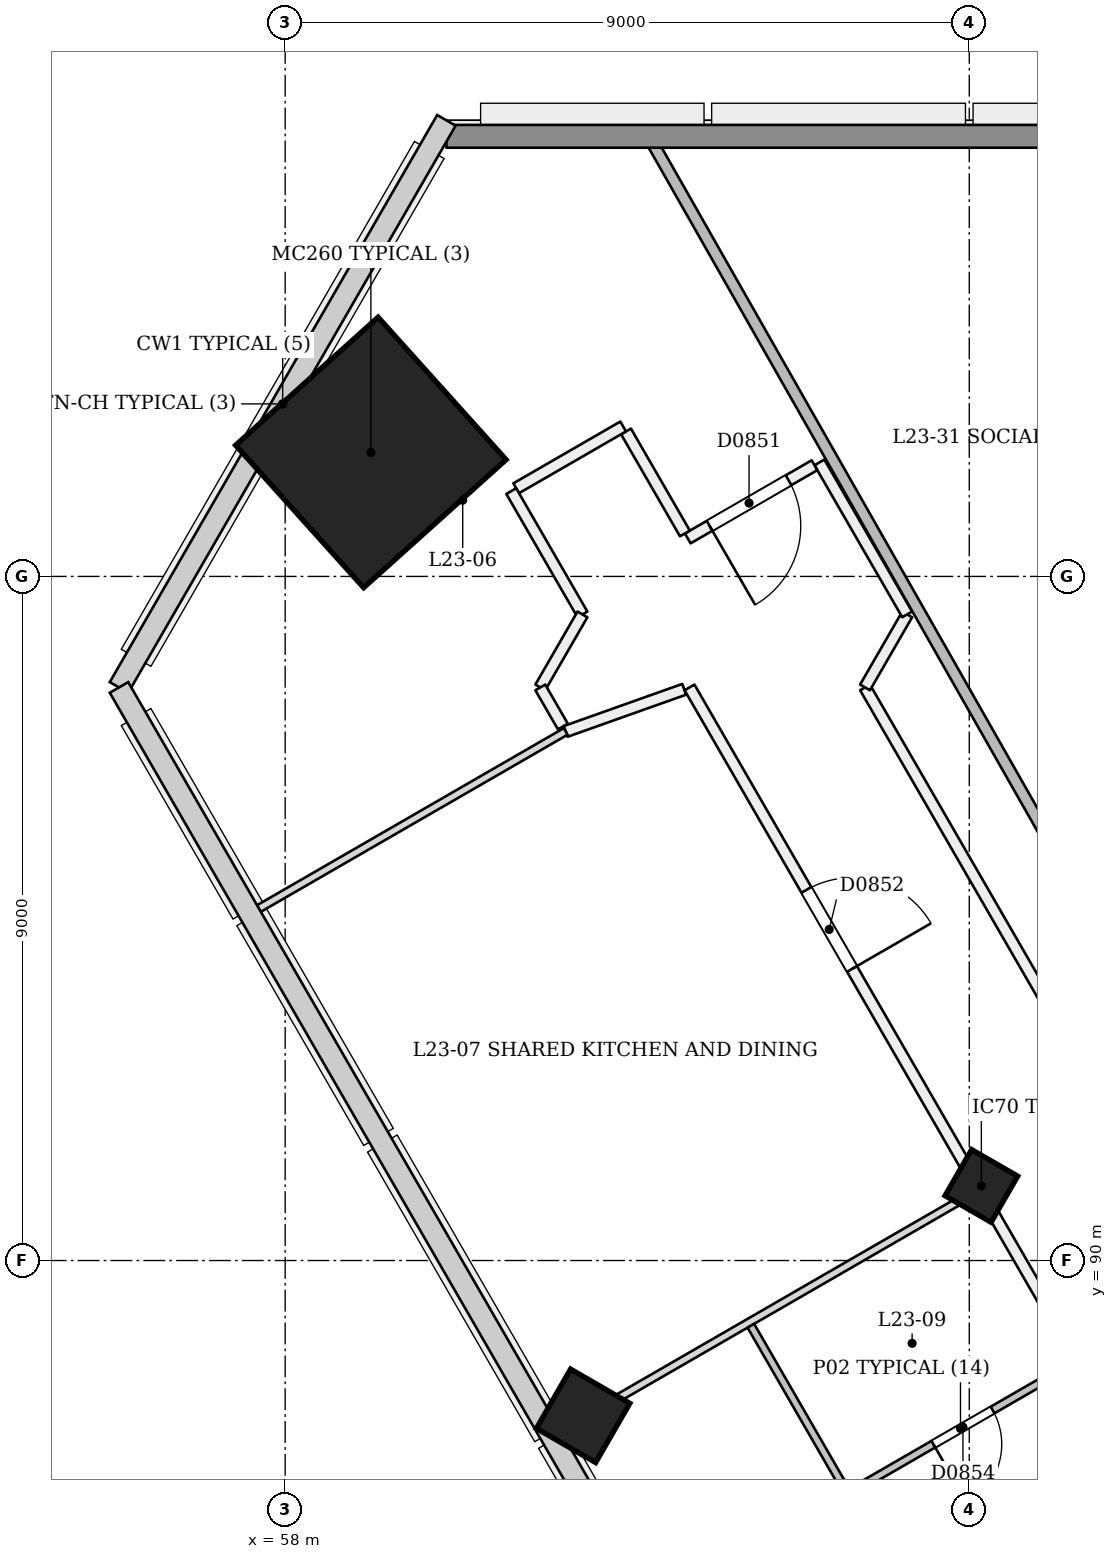
"""IFC4 building model, lengths in metres.
Left out: names, types, materials, properties, quantities, classifications, styles, units other than length and angle.
Written with IfcOpenShell. Run it as: python <this file> out.ifc"""

import sys

from ifc_helpers import new_model, si_unit, direction, frame, frame_2d, origin, origin_2d, place, context, subcontext, project, spatial, rectangle, extrude, element, fill, save


model = new_model("IFC4")
c1 = context("Model", 3, precision=1e-05, world=origin(), true_north=direction((0.0, 1.0)))
c2 = subcontext(c1, "Body", "Model", "MODEL_VIEW")
j1 = project(units=[si_unit("LENGTHUNIT", "METRE"), si_unit("PLANEANGLEUNIT", "RADIAN")], contexts=[c1])
p1 = place(None, origin())
s1 = spatial("IfcSite", under=j1, at=p1, CompositionType="ELEMENT")
p2 = place(p1, origin())
s2 = spatial("IfcBuilding", under=s1, at=p2, CompositionType="ELEMENT")
p3 = place(p2, frame((0.0, 0.0, 91.8)))
s3 = spatial("IfcBuildingStorey", under=s2, at=p3, CompositionType="ELEMENT", Elevation=91.8)
p4 = place(p3, frame((67.132, 90.934, -0.021), z_axis=(0.022155133694, 0.038483534979, 0.999013597298), x_axis=(-0.864980082328, -0.500330471121, 0.038456167821)))
e1 = element("IfcColumn", 1, at=p4, inside=s3, PredefinedType="COLUMN", context=c2, shape_type="SweptSolid", body=[
    extrude(rectangle(XDim=0.7, YDim=0.7, at=origin_2d()), origin(), (0.0, 0.0, 1.0), 3.604),
])
p5 = place(p3, frame((59.093, 100.62, 0.0), z_axis=(0.028403739082, 0.009219352065, 0.999554016126), x_axis=(-0.865122942828, 0.501162491493, 0.01996123528)))
e2 = element("IfcColumn", 2, at=p5, inside=s3, PredefinedType="COLUMN", context=c2, shape_type="SweptSolid", body=[
    extrude(rectangle(XDim=2.52, YDim=2.52, at=origin_2d()), origin(), (0.0, 0.0, 1.0), 3.602),
])
p6 = place(p3, frame((61.892, 87.909, -0.027), z_axis=(0.022189843276, 0.038462395012, 0.999013641061), x_axis=(-0.865440194325, -0.49953425098, 0.038455196587)))
e3 = element("IfcColumn", 3, at=p6, inside=s3, PredefinedType="COLUMN", context=c2, shape_type="SweptSolid", body=[
    extrude(rectangle(XDim=0.9, YDim=0.9, at=origin_2d()), origin(), (0.0, 0.0, 1.0), 3.631),
])
p7 = place(p3, frame((68.596, 92.4, 0.0), z_axis=(0.0, 0.0, 1.0), x_axis=(-0.500019194352, 0.866014321637, 0.0)))
e4 = element("IfcWall", 4, at=p7, inside=s3, PredefinedType="PARTITIONING", context=c2, shape_type="SweptSolid", body=[
    extrude(rectangle(XDim=5.935, YDim=0.15, at=frame_2d((2.967, 0.0))), origin(), (0.0, 0.0, 1.0), 3.3),
])
p8 = place(p3, frame((65.629, 97.54, 0.0), z_axis=(0.0, 0.0, 1.0), x_axis=(0.50011622646, 0.865958290007, 0.0)))
e5 = element("IfcWall", 5, at=p8, inside=s3, PredefinedType="PARTITIONING", context=c2, shape_type="SweptSolid", body=[
    extrude(rectangle(XDim=1.109, YDim=0.15, at=frame_2d((0.555, 0.0))), origin(), (0.0, 0.0, 1.0), 3.3),
])
p9 = place(p3, frame((66.183, 98.5, 0.0), z_axis=(0.0, 0.0, 1.0), x_axis=(-0.500027479704, 0.866009537788, 0.0)))
e6 = element("IfcWall", 6, at=p9, inside=s3, PredefinedType="PARTITIONING", context=c2, shape_type="SweptSolid", body=[
    extrude(rectangle(XDim=2.309, YDim=0.15, at=frame_2d((1.155, 0.0))), origin(), (0.0, 0.0, 1.0), 3.3),
])
p10 = place(p3, frame((64.964, 100.462, 0.0), z_axis=(0.0, 0.0, 1.0), x_axis=(-0.866033512162, -0.499985955615, 0.0)))
e7 = element("IfcWall", 7, at=p10, inside=s3, PredefinedType="PARTITIONING", context=c2, shape_type="SweptSolid", body=[
    extrude(rectangle(XDim=1.925, YDim=0.15, at=frame_2d((0.962, 0.0))), origin(), (0.0, 0.0, 1.0), 3.3),
])
p11 = place(p10, frame((0.394, 0.0, 0.0)))
e8 = element("IfcOpeningElement", 8, at=p11, cuts=e7, PredefinedType="OPENING", context=c2, shape_type="SweptSolid", body=[
    extrude(rectangle(XDim=1.2, YDim=2.1, at=frame_2d((0.6, 1.05))), frame((0.0, 0.085, 0.0), z_axis=(0.0, -1.0, 0.0), x_axis=(1.0, 0.0, 0.0)), (0.0, 0.0, 1.0), 0.171),
])
p12 = place(p3, frame((63.259, 99.565, 0.0), z_axis=(0.0, 0.0, 1.0), x_axis=(-0.499967891604, 0.866043940782, 0.0)))
e9 = element("IfcWall", 9, at=p12, inside=s3, PredefinedType="PARTITIONING", context=c2, shape_type="SweptSolid", body=[
    extrude(rectangle(XDim=1.55, YDim=0.15, at=frame_2d((0.775, 0.0))), origin(), (0.0, 0.0, 1.0), 3.3),
])
p13 = place(p3, frame((62.447, 100.972, 0.0), z_axis=(0.0, 0.0, 1.0), x_axis=(-0.866015446554, -0.500017246033, 0.0)))
e10 = element("IfcWall", 10, at=p13, inside=s3, PredefinedType="PARTITIONING", context=c2, shape_type="SweptSolid", body=[
    extrude(rectangle(XDim=1.625, YDim=0.15, at=frame_2d((0.812, 0.0))), origin(), (0.0, 0.0, 1.0), 3.3),
])
p14 = place(p3, frame((60.974, 100.122, 0.0), z_axis=(0.0, 0.0, 1.0), x_axis=(0.499951854219, -0.86605319898, 0.0)))
e11 = element("IfcWall", 11, at=p14, inside=s3, PredefinedType="PARTITIONING", context=c2, shape_type="SweptSolid", body=[
    extrude(rectangle(XDim=1.873, YDim=0.15, at=frame_2d((0.937, 0.0))), origin(), (0.0, 0.0, 1.0), 3.3),
])
p15 = place(p3, frame((61.911, 98.5, 0.0), z_axis=(0.0, 0.0, 1.0), x_axis=(-0.499951133605, -0.866053614973, 0.0)))
e12 = element("IfcWall", 12, at=p15, inside=s3, PredefinedType="PARTITIONING", context=c2, shape_type="SweptSolid", body=[
    extrude(rectangle(XDim=1.109, YDim=0.15, at=frame_2d((0.554, 0.0))), origin(), (0.0, 0.0, 1.0), 3.3),
])
p16 = place(p3, frame((61.356, 97.54, 0.0), z_axis=(0.0, 0.0, 1.0), x_axis=(0.499983247966, -0.86603507536, 0.0)))
e13 = element("IfcWall", 13, at=p16, inside=s3, PredefinedType="PARTITIONING", context=c2, shape_type="SweptSolid", body=[
    extrude(rectangle(XDim=0.594, YDim=0.15, at=frame_2d((0.297, 0.0))), origin(), (0.0, 0.0, 1.0), 3.3),
])
p17 = place(p3, frame((61.69, 96.961, 0.0), z_axis=(0.0, 0.0, 1.0), x_axis=(0.942304690634, 0.334756433858, 0.0)))
e14 = element("IfcWall", 14, at=p17, inside=s3, PredefinedType="PARTITIONING", context=c2, shape_type="SweptSolid", body=[
    extrude(rectangle(XDim=1.655, YDim=0.15, at=frame_2d((0.827, 0.0))), origin(), (0.0, 0.0, 1.0), 3.3),
])
p18 = place(p3, frame((63.319, 97.54, 0.0), z_axis=(0.0, 0.0, 1.0), x_axis=(0.500001382442, -0.86602460563, 0.0)))
e15 = element("IfcWall", 15, at=p18, inside=s3, PredefinedType="PARTITIONING", context=c2, shape_type="SweptSolid", body=[
    extrude(rectangle(XDim=42.252, YDim=0.15, at=frame_2d((21.126, 0.0))), origin(), (0.0, 0.0, 1.0), 2.9),
])
p19 = place(p18, frame((3.076, 0.0, 0.0)))
e16 = element("IfcOpeningElement", 16, at=p19, cuts=e15, PredefinedType="OPENING", context=c2, shape_type="SweptSolid", body=[
    extrude(rectangle(XDim=1.2, YDim=2.1, at=frame_2d((0.6, 1.05))), frame((0.0, 0.085, 0.0), z_axis=(0.0, -1.0, 0.0), x_axis=(1.0, 0.0, 0.0)), (0.0, 0.0, 1.0), 0.171),
])
p20 = place(p18, frame((10.455, 0.0, 0.0)))
e17 = element("IfcOpeningElement", 17, at=p20, cuts=e15, PredefinedType="OPENING", context=c2, shape_type="SweptSolid", body=[
    extrude(rectangle(XDim=1.1, YDim=2.1, at=frame_2d((0.55, 1.05))), frame((0.0, 0.085, 0.0), z_axis=(0.0, -1.0, 0.0), x_axis=(1.0, 0.0, 0.0)), (0.0, 0.0, 1.0), 0.171),
])
p21 = place(p18, frame((13.876, 0.0, 0.0)))
e18 = element("IfcOpeningElement", 18, at=p21, cuts=e15, PredefinedType="OPENING", context=c2, shape_type="SweptSolid", body=[
    extrude(rectangle(XDim=1.0, YDim=2.1, at=frame_2d((0.5, 1.05))), frame((0.0, 0.085, 0.0), z_axis=(0.0, -1.0, 0.0), x_axis=(1.0, 0.0, 0.0)), (0.0, 0.0, 1.0), 0.171),
])
p22 = place(p18, frame((18.376, 0.0, 0.0)))
e19 = element("IfcOpeningElement", 19, at=p22, cuts=e15, PredefinedType="OPENING", context=c2, shape_type="SweptSolid", body=[
    extrude(rectangle(XDim=1.0, YDim=2.1, at=frame_2d((0.5, 1.05))), frame((0.0, 0.085, 0.0), z_axis=(0.0, -1.0, 0.0), x_axis=(1.0, 0.0, 0.0)), (0.0, 0.0, 1.0), 0.171),
])
p23 = place(p18, frame((21.731, 0.0, 0.0)))
e20 = element("IfcOpeningElement", 20, at=p23, cuts=e15, PredefinedType="OPENING", context=c2, shape_type="SweptSolid", body=[
    extrude(rectangle(XDim=1.0, YDim=2.1, at=frame_2d((0.5, 1.05))), frame((0.0, 0.085, 0.0), z_axis=(0.0, -1.0, 0.0), x_axis=(1.0, 0.0, 0.0)), (0.0, 0.0, 1.0), 0.171),
])
p24 = place(p18, frame((28.406, 0.0, 0.0)))
e21 = element("IfcOpeningElement", 21, at=p24, cuts=e15, PredefinedType="OPENING", context=c2, shape_type="SweptSolid", body=[
    extrude(rectangle(XDim=1.0, YDim=2.1, at=frame_2d((0.5, 1.05))), frame((0.0, 0.085, 0.0), z_axis=(0.0, -1.0, 0.0), x_axis=(1.0, 0.0, 0.0)), (0.0, 0.0, 1.0), 0.171),
])
p25 = place(p18, frame((30.847, 0.0, 0.0)))
e22 = element("IfcOpeningElement", 22, at=p25, cuts=e15, PredefinedType="OPENING", context=c2, shape_type="SweptSolid", body=[
    extrude(rectangle(XDim=1.0, YDim=2.1, at=frame_2d((0.5, 1.05))), frame((0.0, 0.085, 0.0), z_axis=(0.0, -1.0, 0.0), x_axis=(1.0, 0.0, 0.0)), (0.0, 0.0, 1.0), 0.171),
])
p26 = place(p18, frame((37.989, 0.0, 0.0)))
e23 = element("IfcOpeningElement", 23, at=p26, cuts=e15, PredefinedType="OPENING", context=c2, shape_type="SweptSolid", body=[
    extrude(rectangle(XDim=1.2, YDim=2.1, at=frame_2d((0.6, 1.05))), frame((0.0, 0.085, 0.0), z_axis=(0.0, -1.0, 0.0), x_axis=(1.0, 0.0, 0.0)), (0.0, 0.0, 1.0), 0.171),
])
p27 = place(p3, frame((57.603, 94.601, 0.0), z_axis=(0.0, 0.0, 1.0), x_axis=(0.866028828302, 0.499994068514, 0.0)))
e24 = element("IfcWall", 24, at=p27, inside=s3, PredefinedType="PARTITIONING", context=c2, shape_type="SweptSolid", body=[
    extrude(rectangle(XDim=4.72, YDim=0.1, at=frame_2d((2.36, 0.0))), origin(), (0.0, 0.0, 1.0), 3.3),
])
p28 = place(p3, frame((69.829, 92.401, 0.0), z_axis=(0.0, 0.0, 1.0), x_axis=(-0.494399076239, 0.869235039223, 0.0)))
e25 = element("IfcWall", 25, at=p28, inside=s3, PredefinedType="PARTITIONING", context=c2, shape_type="SweptSolid", body=[
    extrude(rectangle(XDim=14.379, YDim=0.15, at=frame_2d((7.19, 0.0))), origin(), (0.0, 0.0, 1.0), 3.3),
])
p29 = place(p3, frame((61.59, 87.735, 0.0), z_axis=(0.0, 0.0, 1.0), x_axis=(0.866015887322, 0.500016482634, 0.0)))
e26 = element("IfcWall", 26, at=p29, inside=s3, PredefinedType="PARTITIONING", context=c2, shape_type="SweptSolid", body=[
    extrude(rectangle(XDim=6.325, YDim=0.1, at=frame_2d((3.163, 0.0))), origin(), (0.0, 0.0, 1.0), 2.9),
])
p30 = place(p3, frame((68.367, 88.646, 0.0), z_axis=(0.0, 0.0, 1.0), x_axis=(-0.866032454348, -0.499987787867, 0.0)))
e27 = element("IfcWall", 27, at=p30, inside=s3, PredefinedType="PARTITIONING", context=c2, shape_type="SweptSolid", body=[
    extrude(rectangle(XDim=3.425, YDim=0.1, at=frame_2d((1.712, 0.0))), origin(), (0.0, 0.0, 1.0), 3.3),
])
p31 = place(p30, frame((1.225, 0.0, 0.0)))
e28 = element("IfcOpeningElement", 28, at=p31, cuts=e27, PredefinedType="OPENING", context=c2, shape_type="SweptSolid", body=[
    extrude(rectangle(XDim=0.9, YDim=2.1, at=frame_2d((0.45, 1.05))), frame((0.0, 0.061, 0.0), z_axis=(0.0, -1.0, 0.0), x_axis=(1.0, 0.0, 0.0)), (0.0, 0.0, 1.0), 0.121),
])
p32 = place(p3, frame((65.401, 86.934, 0.0), z_axis=(0.0, 0.0, 1.0), x_axis=(-0.499990435942, 0.866030925526, 0.0)))
e29 = element("IfcWall", 29, at=p32, inside=s3, PredefinedType="PARTITIONING", context=c2, shape_type="SweptSolid", body=[
    extrude(rectangle(XDim=2.55, YDim=0.1, at=frame_2d((1.275, 0.0))), origin(), (0.0, 0.0, 1.0), 2.9),
])
p33 = place(p3, frame((60.121, 104.79, 0.0), z_axis=(0.0, 0.0, 1.0), x_axis=(1.0, 0.0, 0.0)))
e30 = element("IfcWall", 30, at=p33, inside=s3, PredefinedType="SOLIDWALL", context=c2, shape_type="SweptSolid", body=[
    extrude(rectangle(XDim=49.758, YDim=0.3, at=frame_2d((24.879, 0.0))), origin(), (0.0, 0.0, 1.0), 3.3),
])
p34 = place(p11, origin())
e31 = element("IfcDoor", 31, at=p34, inside=s3, OperationType="SINGLE_SWING_RIGHT", PredefinedType="NOTDEFINED", context=c2, shape_type="SweptSolid", body=[
    extrude(rectangle(XDim=1.2, YDim=2.1, at=frame_2d((0.6, 1.05))), frame((0.0, 0.025, 0.0), z_axis=(0.0, -1.0, 0.0), x_axis=(1.0, 0.0, 0.0)), (0.0, 0.0, 1.0), 0.05),
])
fill(e8, e31)
p35 = place(p19, origin())
e32 = element("IfcDoor", 32, at=p35, inside=s3, OperationType="SINGLE_SWING_RIGHT", PredefinedType="NOTDEFINED", context=c2, shape_type="SweptSolid", body=[
    extrude(rectangle(XDim=1.2, YDim=2.1, at=frame_2d((0.6, 1.05))), frame((0.0, 0.025, 0.0), z_axis=(0.0, -1.0, 0.0), x_axis=(1.0, 0.0, 0.0)), (0.0, 0.0, 1.0), 0.05),
])
fill(e16, e32)
p36 = place(p31, origin())
e33 = element("IfcDoor", 33, at=p36, inside=s3, OperationType="SINGLE_SWING_RIGHT", PredefinedType="NOTDEFINED", context=c2, shape_type="SweptSolid", body=[
    extrude(rectangle(XDim=0.9, YDim=2.1, at=frame_2d((0.45, 1.05))), frame((0.0, 0.025, 0.0), z_axis=(0.0, -1.0, 0.0), x_axis=(1.0, 0.0, 0.0)), (0.0, 0.0, 1.0), 0.05),
])
fill(e28, e33)
save(model, sys.argv[1])
